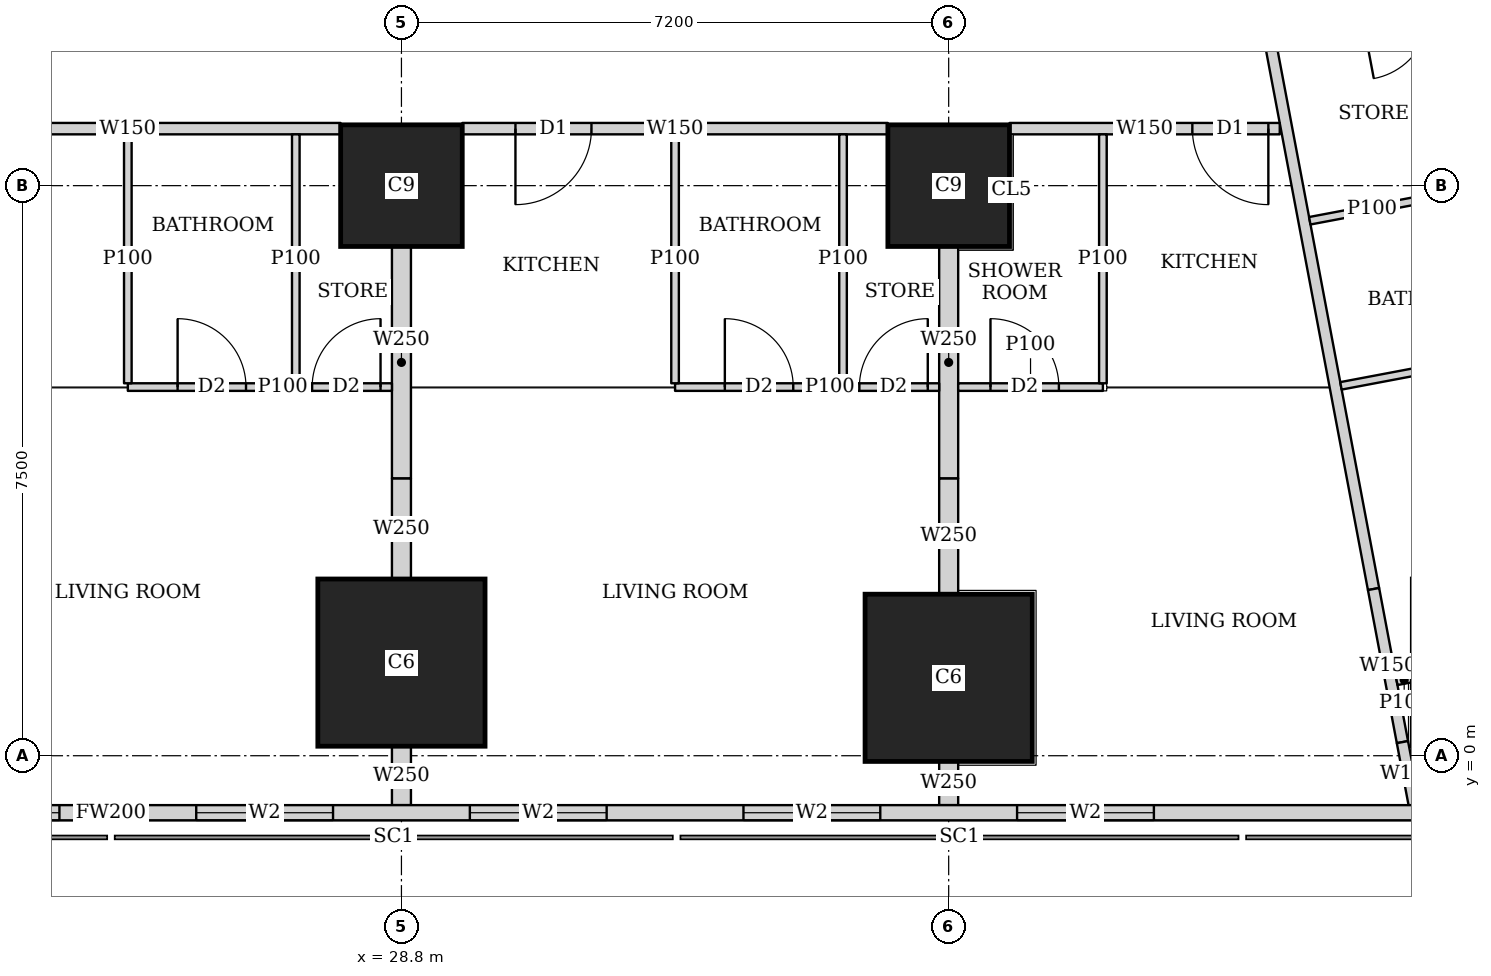
"""IFC4 building model, lengths in metres.
Left out: names, types, materials, properties, quantities, classifications, styles, units other than length and angle.
Written with IfcOpenShell. Run it as: python <this file> out.ifc"""

import sys

from ifc_helpers import new_model, si_unit, direction, frame, frame_2d, origin, origin_2d, place, context, subcontext, project, spatial, rectangle, extrude, element, fill, save


model = new_model("IFC4")
c1 = context("Model", 3, precision=1e-05, world=origin(), true_north=direction((0.0, 1.0)))
c2 = subcontext(c1, "Body", "Model", "MODEL_VIEW")
j1 = project(units=[si_unit("LENGTHUNIT", "METRE"), si_unit("PLANEANGLEUNIT", "RADIAN")], contexts=[c1])
p1 = place(None, origin())
s1 = spatial("IfcSite", under=j1, at=p1, CompositionType="ELEMENT")
p2 = place(p1, origin())
s2 = spatial("IfcBuilding", under=s1, at=p2, CompositionType="ELEMENT")
p3 = place(p2, frame((0.0, 0.0, 126.65)))
s3 = spatial("IfcBuildingStorey", under=s2, at=p3, CompositionType="ELEMENT", Elevation=126.65)
for number, where, z_axis, x_axis in (
    (1, (28.8, 1.225, 0.0), (0.0, 0.0, 1.0), (1.0, 0.0, 0.0)),
    (2, (36.0, 1.025, 0.0), (0.0, 0.0, 1.0), (1.0, 0.0, 0.0)),
):
    element("IfcColumn", number, at=place(p3, frame(where, z_axis=z_axis, x_axis=x_axis)), inside=s3, PredefinedType="COLUMN", context=c2, shape_type="SweptSolid", body=[
        extrude(rectangle(XDim=2.2, YDim=2.2, at=origin_2d()), origin(), (0.0, 0.0, 1.0), 3.75),
    ])
for number, where, z_axis, x_axis in (
    (3, (28.8, 7.5, 0.0), (0.0, 0.0, 1.0), (1.0, 0.0, 0.0)),
    (4, (36.0, 7.5, 0.0), (0.0, 0.0, 1.0), (1.0, 0.0, 0.0)),
):
    element("IfcColumn", number, at=place(p3, frame(where, z_axis=z_axis, x_axis=x_axis)), inside=s3, PredefinedType="COLUMN", context=c2, shape_type="SweptSolid", body=[
        extrude(rectangle(XDim=1.6, YDim=1.6, at=origin_2d()), origin(), (0.0, 0.0, 1.0), 3.75),
    ])
p4 = place(p3, frame((2.163, -0.75, 0.0), z_axis=(0.0, 0.0, 1.0), x_axis=(1.0, 0.0, 0.0)))
e5 = element("IfcWall", 5, at=p4, inside=s3, PredefinedType="SOLIDWALL", context=c2, shape_type="SweptSolid", body=[
    extrude(rectangle(XDim=45.628, YDim=0.2, at=frame_2d((22.814, 0.0))), origin(), (0.0, 0.0, 1.0), 3.45),
])
p5 = place(p4, frame((9.537, 0.0, 0.9)))
e6 = element("IfcOpeningElement", 6, at=p5, cuts=e5, PredefinedType="OPENING", context=c2, shape_type="SweptSolid", body=[
    extrude(rectangle(XDim=1.8, YDim=1.5, at=frame_2d((0.9, 0.75))), frame((0.0, 0.11, 0.0), z_axis=(0.0, -1.0, 0.0), x_axis=(1.0, 0.0, 0.0)), (0.0, 0.0, 1.0), 0.22),
])
p6 = place(p4, frame((13.137, 0.0, 0.9)))
e7 = element("IfcOpeningElement", 7, at=p6, cuts=e5, PredefinedType="OPENING", context=c2, shape_type="SweptSolid", body=[
    extrude(rectangle(XDim=1.8, YDim=1.5, at=frame_2d((0.9, 0.75))), frame((0.0, 0.11, 0.0), z_axis=(0.0, -1.0, 0.0), x_axis=(1.0, 0.0, 0.0)), (0.0, 0.0, 1.0), 0.22),
])
p7 = place(p4, frame((16.737, 0.0, 0.9)))
e8 = element("IfcOpeningElement", 8, at=p7, cuts=e5, PredefinedType="OPENING", context=c2, shape_type="SweptSolid", body=[
    extrude(rectangle(XDim=1.8, YDim=1.5, at=frame_2d((0.9, 0.75))), frame((0.0, 0.11, 0.0), z_axis=(0.0, -1.0, 0.0), x_axis=(1.0, 0.0, 0.0)), (0.0, 0.0, 1.0), 0.22),
])
p8 = place(p4, frame((20.337, 0.0, 0.9)))
e9 = element("IfcOpeningElement", 9, at=p8, cuts=e5, PredefinedType="OPENING", context=c2, shape_type="SweptSolid", body=[
    extrude(rectangle(XDim=1.8, YDim=1.5, at=frame_2d((0.9, 0.75))), frame((0.0, 0.11, 0.0), z_axis=(0.0, -1.0, 0.0), x_axis=(1.0, 0.0, 0.0)), (0.0, 0.0, 1.0), 0.22),
])
p9 = place(p4, frame((23.937, 0.0, 0.9)))
e10 = element("IfcOpeningElement", 10, at=p9, cuts=e5, PredefinedType="OPENING", context=c2, shape_type="SweptSolid", body=[
    extrude(rectangle(XDim=1.8, YDim=1.5, at=frame_2d((0.9, 0.75))), frame((0.0, 0.11, 0.0), z_axis=(0.0, -1.0, 0.0), x_axis=(1.0, 0.0, 0.0)), (0.0, 0.0, 1.0), 0.22),
])
p10 = place(p4, frame((27.537, 0.0, 0.9)))
e11 = element("IfcOpeningElement", 11, at=p10, cuts=e5, PredefinedType="OPENING", context=c2, shape_type="SweptSolid", body=[
    extrude(rectangle(XDim=1.8, YDim=1.5, at=frame_2d((0.9, 0.75))), frame((0.0, 0.11, 0.0), z_axis=(0.0, -1.0, 0.0), x_axis=(1.0, 0.0, 0.0)), (0.0, 0.0, 1.0), 0.22),
])
p11 = place(p4, frame((31.137, 0.0, 0.9)))
e12 = element("IfcOpeningElement", 12, at=p11, cuts=e5, PredefinedType="OPENING", context=c2, shape_type="SweptSolid", body=[
    extrude(rectangle(XDim=1.8, YDim=1.5, at=frame_2d((0.9, 0.75))), frame((0.0, 0.11, 0.0), z_axis=(0.0, -1.0, 0.0), x_axis=(1.0, 0.0, 0.0)), (0.0, 0.0, 1.0), 0.22),
])
p12 = place(p4, frame((34.737, 0.0, 0.9)))
e13 = element("IfcOpeningElement", 13, at=p12, cuts=e5, PredefinedType="OPENING", context=c2, shape_type="SweptSolid", body=[
    extrude(rectangle(XDim=1.8, YDim=1.5, at=frame_2d((0.9, 0.75))), frame((0.0, 0.11, 0.0), z_axis=(0.0, -1.0, 0.0), x_axis=(1.0, 0.0, 0.0)), (0.0, 0.0, 1.0), 0.22),
])
p13 = place(p3, frame((40.356, 8.25, 0.0), z_axis=(0.0, 0.0, 1.0), x_axis=(-1.0, 0.0, 0.0)))
e14 = element("IfcWall", 14, at=p13, inside=s3, PredefinedType="SOLIDWALL", context=c2, shape_type="SweptSolid", body=[
    extrude(rectangle(XDim=3.555, YDim=0.15, at=frame_2d((1.777, 0.0))), origin(), (0.0, 0.0, 1.0), 3.45),
])
p14 = place(p13, frame((0.15, 0.0, 0.0)))
e15 = element("IfcOpeningElement", 15, at=p14, cuts=e14, PredefinedType="OPENING", context=c2, shape_type="SweptSolid", body=[
    extrude(rectangle(XDim=1.0, YDim=2.1, at=frame_2d((0.5, 1.05))), frame((0.0, 0.085, 0.0), z_axis=(0.0, -1.0, 0.0), x_axis=(1.0, 0.0, 0.0)), (0.0, 0.0, 1.0), 0.17),
])
p15 = place(p3, frame((35.199, 8.25, 0.0), z_axis=(0.0, 0.0, 1.0), x_axis=(-1.0, 0.0, 0.0)))
e16 = element("IfcWall", 16, at=p15, inside=s3, PredefinedType="SOLIDWALL", context=c2, shape_type="SweptSolid", body=[
    extrude(rectangle(XDim=5.598, YDim=0.15, at=frame_2d((2.799, 0.0))), origin(), (0.0, 0.0, 1.0), 3.45),
])
p16 = place(p15, frame((3.899, 0.0, 0.0)))
e17 = element("IfcOpeningElement", 17, at=p16, cuts=e16, PredefinedType="OPENING", context=c2, shape_type="SweptSolid", body=[
    extrude(rectangle(XDim=1.0, YDim=2.1, at=frame_2d((0.5, 1.05))), frame((0.0, 0.085, 0.0), z_axis=(0.0, -1.0, 0.0), x_axis=(1.0, 0.0, 0.0)), (0.0, 0.0, 1.0), 0.17),
])
p17 = place(p3, frame((27.999, 8.25, 0.0), z_axis=(0.0, 0.0, 1.0), x_axis=(-1.0, 0.0, 0.0)))
e18 = element("IfcWall", 18, at=p17, inside=s3, PredefinedType="SOLIDWALL", context=c2, shape_type="SweptSolid", body=[
    extrude(rectangle(XDim=5.598, YDim=0.15, at=frame_2d((2.799, 0.0))), origin(), (0.0, 0.0, 1.0), 3.45),
])
p18 = place(p17, frame((3.899, 0.0, 0.0)))
e19 = element("IfcOpeningElement", 19, at=p18, cuts=e18, PredefinedType="OPENING", context=c2, shape_type="SweptSolid", body=[
    extrude(rectangle(XDim=1.0, YDim=2.1, at=frame_2d((0.5, 1.05))), frame((0.0, 0.085, 0.0), z_axis=(0.0, -1.0, 0.0), x_axis=(1.0, 0.0, 0.0)), (0.0, 0.0, 1.0), 0.17),
])
p19 = place(p3, frame((33.896, 42.929, 0.0), z_axis=(0.0, 0.0, 1.0), x_axis=(0.1855961604, -0.982626106535, 0.0)))
e20 = element("IfcWall", 20, at=p19, inside=s3, PredefinedType="SOLIDWALL", context=c2, shape_type="SweptSolid", body=[
    extrude(rectangle(XDim=41.456, YDim=0.15, at=frame_2d((20.728, 0.0))), origin(), (0.0, 0.0, 1.0), 2.45),
])
p20 = place(p19, frame((7.893, 0.0, 0.0)))
e21 = element("IfcOpeningElement", 21, at=p20, cuts=e20, PredefinedType="OPENING", context=c2, shape_type="SweptSolid", body=[
    extrude(rectangle(XDim=1.0, YDim=2.1, at=frame_2d((0.5, 1.05))), frame((0.0, 0.085, 0.0), z_axis=(0.0, -1.0, 0.0), x_axis=(1.0, 0.0, 0.0)), (0.0, 0.0, 1.0), 0.17),
])
p21 = place(p19, frame((12.468, 0.0, 0.0)))
e22 = element("IfcOpeningElement", 22, at=p21, cuts=e20, PredefinedType="OPENING", context=c2, shape_type="SweptSolid", body=[
    extrude(rectangle(XDim=1.0, YDim=2.1, at=frame_2d((0.5, 1.05))), frame((0.0, 0.085, 0.0), z_axis=(0.0, -1.0, 0.0), x_axis=(1.0, 0.0, 0.0)), (0.0, 0.0, 1.0), 0.17),
])
p22 = place(p19, frame((20.101, 0.0, 0.0)))
e23 = element("IfcOpeningElement", 23, at=p22, cuts=e20, PredefinedType="OPENING", context=c2, shape_type="SweptSolid", body=[
    extrude(rectangle(XDim=1.0, YDim=2.1, at=frame_2d((0.5, 1.05))), frame((0.0, 0.085, 0.0), z_axis=(0.0, -1.0, 0.0), x_axis=(1.0, 0.0, 0.0)), (0.0, 0.0, 1.0), 0.17),
])
p23 = place(p19, frame((31.064, 0.0, 0.0)))
e24 = element("IfcOpeningElement", 24, at=p23, cuts=e20, PredefinedType="OPENING", context=c2, shape_type="SweptSolid", body=[
    extrude(rectangle(XDim=1.0, YDim=2.1, at=frame_2d((0.5, 1.05))), frame((0.0, 0.085, 0.0), z_axis=(0.0, -1.0, 0.0), x_axis=(1.0, 0.0, 0.0)), (0.0, 0.0, 1.0), 0.17),
])
p24 = place(p3, frame((41.59, 2.193, 0.0), z_axis=(0.0, 0.0, 1.0), x_axis=(0.185338414215, -0.982674754034, 0.0)))
e25 = element("IfcWall", 25, at=p24, inside=s3, PredefinedType="SOLIDWALL", context=c2, shape_type="SweptSolid", body=[
    extrude(rectangle(XDim=2.05, YDim=0.15, at=frame_2d((1.025, 0.0))), origin(), (0.0, 0.0, 1.0), 2.15),
])
p25 = place(p3, frame((41.97, 0.179, 0.0), z_axis=(0.0, 0.0, 1.0), x_axis=(0.186088003244, -0.982533080893, 0.0)))
e26 = element("IfcWall", 26, at=p25, inside=s3, PredefinedType="SOLIDWALL", context=c2, shape_type="SweptSolid", body=[
    extrude(rectangle(XDim=0.844, YDim=0.15, at=frame_2d((0.422, 0.0))), origin(), (0.0, 0.0, 1.0), 3.45),
])
p26 = place(p3, frame((28.675, 4.85, 0.0), z_axis=(0.0, 0.0, 1.0), x_axis=(-1.0, 0.0, 0.0)))
e27 = element("IfcWall", 27, at=p26, inside=s3, PredefinedType="PARTITIONING", context=c2, shape_type="SweptSolid", body=[
    extrude(rectangle(XDim=3.475, YDim=0.1, at=frame_2d((1.738, 0.0))), origin(), (0.0, 0.0, 1.0), 3.45),
])
p27 = place(p26, frame((1.92, 0.0, 0.0)))
e28 = element("IfcOpeningElement", 28, at=p27, cuts=e27, PredefinedType="OPENING", context=c2, shape_type="SweptSolid", body=[
    extrude(rectangle(XDim=0.9, YDim=2.1, at=frame_2d((0.45, 1.05))), frame((0.0, 0.06, 0.0), z_axis=(0.0, -1.0, 0.0), x_axis=(1.0, 0.0, 0.0)), (0.0, 0.0, 1.0), 0.12),
])
p28 = place(p26, frame((0.15, 0.0, 0.0)))
e29 = element("IfcOpeningElement", 29, at=p28, cuts=e27, PredefinedType="OPENING", context=c2, shape_type="SweptSolid", body=[
    extrude(rectangle(XDim=0.9, YDim=2.1, at=frame_2d((0.45, 1.05))), frame((0.0, 0.06, 0.0), z_axis=(0.0, -1.0, 0.0), x_axis=(1.0, 0.0, 0.0)), (0.0, 0.0, 1.0), 0.12),
])
for number, where, z_axis, x_axis in (
    (30, (25.2, 4.9, 0.0), (0.0, 0.0, 1.0), (0.0, 1.0, 0.0)),
    (31, (27.41, 4.9, 0.0), (0.0, 0.0, 1.0), (0.0, 1.0, 0.0)),
):
    element("IfcWall", number, at=place(p3, frame(where, z_axis=z_axis, x_axis=x_axis)), inside=s3, PredefinedType="PARTITIONING", context=c2, shape_type="SweptSolid", body=[
        extrude(rectangle(XDim=3.275, YDim=0.1, at=frame_2d((1.638, 0.0))), origin(), (0.0, 0.0, 1.0), 3.45),
    ])
p29 = place(p3, frame((35.875, 4.85, 0.0), z_axis=(0.0, 0.0, 1.0), x_axis=(-1.0, 0.0, 0.0)))
e32 = element("IfcWall", 32, at=p29, inside=s3, PredefinedType="PARTITIONING", context=c2, shape_type="SweptSolid", body=[
    extrude(rectangle(XDim=3.475, YDim=0.1, at=frame_2d((1.738, 0.0))), origin(), (0.0, 0.0, 1.0), 3.45),
])
p30 = place(p29, frame((1.92, 0.0, 0.0)))
e33 = element("IfcOpeningElement", 33, at=p30, cuts=e32, PredefinedType="OPENING", context=c2, shape_type="SweptSolid", body=[
    extrude(rectangle(XDim=0.9, YDim=2.1, at=frame_2d((0.45, 1.05))), frame((0.0, 0.06, 0.0), z_axis=(0.0, -1.0, 0.0), x_axis=(1.0, 0.0, 0.0)), (0.0, 0.0, 1.0), 0.12),
])
p31 = place(p29, frame((0.15, 0.0, 0.0)))
e34 = element("IfcOpeningElement", 34, at=p31, cuts=e32, PredefinedType="OPENING", context=c2, shape_type="SweptSolid", body=[
    extrude(rectangle(XDim=0.9, YDim=2.1, at=frame_2d((0.45, 1.05))), frame((0.0, 0.06, 0.0), z_axis=(0.0, -1.0, 0.0), x_axis=(1.0, 0.0, 0.0)), (0.0, 0.0, 1.0), 0.12),
])
for number, where, z_axis, x_axis in (
    (35, (32.4, 4.9, 0.0), (0.0, 0.0, 1.0), (0.0, 1.0, 0.0)),
    (36, (34.61, 4.9, 0.0), (0.0, 0.0, 1.0), (0.0, 1.0, 0.0)),
):
    element("IfcWall", number, at=place(p3, frame(where, z_axis=z_axis, x_axis=x_axis)), inside=s3, PredefinedType="PARTITIONING", context=c2, shape_type="SweptSolid", body=[
        extrude(rectangle(XDim=3.275, YDim=0.1, at=frame_2d((1.638, 0.0))), origin(), (0.0, 0.0, 1.0), 3.45),
    ])
p32 = place(p3, frame((28.8, -0.65, 0.0), z_axis=(0.0, 0.0, 1.0), x_axis=(0.0, 1.0, 0.0)))
e37 = element("IfcWall", 37, at=p32, inside=s3, PredefinedType="SOLIDWALL", context=c2, shape_type="SweptSolid", body=[
    extrude(rectangle(XDim=0.774, YDim=0.25, at=frame_2d((0.387, 0.0))), origin(), (0.0, 0.0, 1.0), 3.45),
])
p33 = place(p3, frame((28.8, 2.326, 0.0), z_axis=(0.0, 0.0, 1.0), x_axis=(0.0, 1.0, 0.0)))
e38 = element("IfcWall", 38, at=p33, inside=s3, PredefinedType="SOLIDWALL", context=c2, shape_type="SweptSolid", body=[
    extrude(rectangle(XDim=1.324, YDim=0.25, at=frame_2d((0.662, 0.0))), origin(), (0.0, 0.0, 1.0), 3.45),
])
p34 = place(p3, frame((28.8, 3.65, 0.0), z_axis=(0.0, 0.0, 1.0), x_axis=(0.0, 1.0, 0.0)))
e39 = element("IfcWall", 39, at=p34, inside=s3, PredefinedType="SOLIDWALL", context=c2, shape_type="SweptSolid", body=[
    extrude(rectangle(XDim=3.049, YDim=0.25, at=frame_2d((1.524, 0.0))), origin(), (0.0, 0.0, 1.0), 3.45),
])
p35 = place(p3, frame((38.029, 4.85, 0.0), z_axis=(0.0, 0.0, 1.0), x_axis=(-1.0, 0.0, 0.0)))
e40 = element("IfcWall", 40, at=p35, inside=s3, PredefinedType="PARTITIONING", context=c2, shape_type="SweptSolid", body=[
    extrude(rectangle(XDim=1.904, YDim=0.1, at=frame_2d((0.952, 0.0))), origin(), (0.0, 0.0, 1.0), 3.45),
])
p36 = place(p35, frame((0.579, 0.0, 0.0)))
e41 = element("IfcOpeningElement", 41, at=p36, cuts=e40, PredefinedType="OPENING", context=c2, shape_type="SweptSolid", body=[
    extrude(rectangle(XDim=0.9, YDim=2.1, at=frame_2d((0.45, 1.05))), frame((0.0, 0.06, 0.0), z_axis=(0.0, -1.0, 0.0), x_axis=(1.0, 0.0, 0.0)), (0.0, 0.0, 1.0), 0.12),
])
p37 = place(p3, frame((38.029, 4.9, 0.0), z_axis=(0.0, 0.0, 1.0), x_axis=(0.0, 1.0, 0.0)))
e42 = element("IfcWall", 42, at=p37, inside=s3, PredefinedType="PARTITIONING", context=c2, shape_type="SweptSolid", body=[
    extrude(rectangle(XDim=3.275, YDim=0.1, at=frame_2d((1.638, 0.0))), origin(), (0.0, 0.0, 1.0), 3.45),
])
p38 = place(p3, frame((36.0, -0.65, 0.0), z_axis=(0.0, 0.0, 1.0), x_axis=(0.0, 1.0, 0.0)))
e43 = element("IfcWall", 43, at=p38, inside=s3, PredefinedType="SOLIDWALL", context=c2, shape_type="SweptSolid", body=[
    extrude(rectangle(XDim=0.574, YDim=0.25, at=frame_2d((0.287, 0.0))), origin(), (0.0, 0.0, 1.0), 3.45),
])
p39 = place(p3, frame((36.0, 2.126, 0.0), z_axis=(0.0, 0.0, 1.0), x_axis=(0.0, 1.0, 0.0)))
e44 = element("IfcWall", 44, at=p39, inside=s3, PredefinedType="SOLIDWALL", context=c2, shape_type="SweptSolid", body=[
    extrude(rectangle(XDim=1.524, YDim=0.25, at=frame_2d((0.762, 0.0))), origin(), (0.0, 0.0, 1.0), 3.45),
])
p40 = place(p3, frame((36.0, 3.65, 0.0), z_axis=(0.0, 0.0, 1.0), x_axis=(0.0, 1.0, 0.0)))
e45 = element("IfcWall", 45, at=p40, inside=s3, PredefinedType="SOLIDWALL", context=c2, shape_type="SweptSolid", body=[
    extrude(rectangle(XDim=3.049, YDim=0.25, at=frame_2d((1.524, 0.0))), origin(), (0.0, 0.0, 1.0), 3.45),
])
p41 = place(p3, frame((42.39, 7.348, 0.0), z_axis=(0.0, 0.0, 1.0), x_axis=(-0.9825976927, -0.185746532405, 0.0)))
e46 = element("IfcWall", 46, at=p41, inside=s3, PredefinedType="PARTITIONING", context=c2, shape_type="SweptSolid", body=[
    extrude(rectangle(XDim=1.668, YDim=0.1, at=frame_2d((0.834, 0.0))), origin(), (0.0, 0.0, 1.0), 3.45),
])
p42 = place(p3, frame((42.09, 1.016, 0.0), z_axis=(0.0, 0.0, 1.0), x_axis=(-0.982208563973, -0.187793335502, 0.0)))
e47 = element("IfcWall", 47, at=p42, inside=s3, PredefinedType="PARTITIONING", context=c2, shape_type="SweptSolid", body=[
    extrude(rectangle(XDim=0.198, YDim=0.1, at=frame_2d((0.099, 0.0))), origin(), (0.0, 0.0, 1.0), 2.0),
])
p43 = place(p3, frame((44.379, 5.474, 0.0), z_axis=(0.0, 0.0, 1.0), x_axis=(-0.982607026909, -0.185697147715, 0.0)))
e48 = element("IfcWall", 48, at=p43, inside=s3, PredefinedType="PARTITIONING", context=c2, shape_type="SweptSolid", body=[
    extrude(rectangle(XDim=3.275, YDim=0.1, at=frame_2d((1.637, 0.0))), origin(), (0.0, 0.0, 1.0), 3.45),
])
p44 = place(p8, origin())
e49 = element("IfcWindow", 49, at=p44, inside=s3, PartitioningType="SINGLE_PANEL", PredefinedType="WINDOW", context=c2, shape_type="SweptSolid", body=[
    extrude(rectangle(XDim=1.8, YDim=1.5, at=frame_2d((0.9, 0.75))), frame((0.0, 0.03, 0.0), z_axis=(0.0, -1.0, 0.0), x_axis=(1.0, 0.0, 0.0)), (0.0, 0.0, 1.0), 0.06),
])
fill(e9, e49)
p45 = place(p9, origin())
e50 = element("IfcWindow", 50, at=p45, inside=s3, PartitioningType="SINGLE_PANEL", PredefinedType="WINDOW", context=c2, shape_type="SweptSolid", body=[
    extrude(rectangle(XDim=1.8, YDim=1.5, at=frame_2d((0.9, 0.75))), frame((0.0, 0.03, 0.0), z_axis=(0.0, -1.0, 0.0), x_axis=(1.0, 0.0, 0.0)), (0.0, 0.0, 1.0), 0.06),
])
fill(e10, e50)
p46 = place(p10, origin())
e51 = element("IfcWindow", 51, at=p46, inside=s3, PartitioningType="SINGLE_PANEL", PredefinedType="WINDOW", context=c2, shape_type="SweptSolid", body=[
    extrude(rectangle(XDim=1.8, YDim=1.5, at=frame_2d((0.9, 0.75))), frame((0.0, 0.03, 0.0), z_axis=(0.0, -1.0, 0.0), x_axis=(1.0, 0.0, 0.0)), (0.0, 0.0, 1.0), 0.06),
])
fill(e11, e51)
p47 = place(p11, origin())
e52 = element("IfcWindow", 52, at=p47, inside=s3, PartitioningType="SINGLE_PANEL", PredefinedType="WINDOW", context=c2, shape_type="SweptSolid", body=[
    extrude(rectangle(XDim=1.8, YDim=1.5, at=frame_2d((0.9, 0.75))), frame((0.0, 0.03, 0.0), z_axis=(0.0, -1.0, 0.0), x_axis=(1.0, 0.0, 0.0)), (0.0, 0.0, 1.0), 0.06),
])
fill(e12, e52)
p48 = place(p12, origin())
e53 = element("IfcWindow", 53, at=p48, inside=s3, PartitioningType="SINGLE_PANEL", PredefinedType="WINDOW", context=c2, shape_type="SweptSolid", body=[
    extrude(rectangle(XDim=1.8, YDim=1.5, at=frame_2d((0.9, 0.75))), frame((0.0, 0.03, 0.0), z_axis=(0.0, -1.0, 0.0), x_axis=(1.0, 0.0, 0.0)), (0.0, 0.0, 1.0), 0.06),
])
fill(e13, e53)
p49 = place(p27, origin())
e54 = element("IfcDoor", 54, at=p49, inside=s3, OperationType="SINGLE_SWING_LEFT", PredefinedType="DOOR", context=c2, shape_type="SweptSolid", body=[
    extrude(rectangle(XDim=0.9, YDim=2.1, at=frame_2d((0.45, 1.05))), frame((0.0, 0.025, 0.0), z_axis=(0.0, -1.0, 0.0), x_axis=(1.0, 0.0, 0.0)), (0.0, 0.0, 1.0), 0.05),
])
fill(e28, e54)
p50 = place(p28, origin())
e55 = element("IfcDoor", 55, at=p50, inside=s3, OperationType="SINGLE_SWING_RIGHT", PredefinedType="DOOR", context=c2, shape_type="SweptSolid", body=[
    extrude(rectangle(XDim=0.9, YDim=2.1, at=frame_2d((0.45, 1.05))), frame((0.0, 0.025, 0.0), z_axis=(0.0, -1.0, 0.0), x_axis=(1.0, 0.0, 0.0)), (0.0, 0.0, 1.0), 0.05),
])
fill(e29, e55)
p51 = place(p30, origin())
e56 = element("IfcDoor", 56, at=p51, inside=s3, OperationType="SINGLE_SWING_LEFT", PredefinedType="DOOR", context=c2, shape_type="SweptSolid", body=[
    extrude(rectangle(XDim=0.9, YDim=2.1, at=frame_2d((0.45, 1.05))), frame((0.0, 0.025, 0.0), z_axis=(0.0, -1.0, 0.0), x_axis=(1.0, 0.0, 0.0)), (0.0, 0.0, 1.0), 0.05),
])
fill(e33, e56)
p52 = place(p31, origin())
e57 = element("IfcDoor", 57, at=p52, inside=s3, OperationType="SINGLE_SWING_RIGHT", PredefinedType="DOOR", context=c2, shape_type="SweptSolid", body=[
    extrude(rectangle(XDim=0.9, YDim=2.1, at=frame_2d((0.45, 1.05))), frame((0.0, 0.025, 0.0), z_axis=(0.0, -1.0, 0.0), x_axis=(1.0, 0.0, 0.0)), (0.0, 0.0, 1.0), 0.05),
])
fill(e34, e57)
p53 = place(p16, origin())
e58 = element("IfcDoor", 58, at=p53, inside=s3, OperationType="SINGLE_SWING_RIGHT", PredefinedType="DOOR", context=c2, shape_type="SweptSolid", body=[
    extrude(rectangle(XDim=1.0, YDim=2.1, at=frame_2d((0.5, 1.05))), frame((0.0, 0.025, 0.0), z_axis=(0.0, -1.0, 0.0), x_axis=(1.0, 0.0, 0.0)), (0.0, 0.0, 1.0), 0.05),
])
fill(e17, e58)
p54 = place(p36, origin())
e59 = element("IfcDoor", 59, at=p54, inside=s3, OperationType="SINGLE_SWING_LEFT", PredefinedType="DOOR", context=c2, shape_type="SweptSolid", body=[
    extrude(rectangle(XDim=0.9, YDim=2.1, at=frame_2d((0.45, 1.05))), frame((0.0, 0.025, 0.0), z_axis=(0.0, -1.0, 0.0), x_axis=(1.0, 0.0, 0.0)), (0.0, 0.0, 1.0), 0.05),
])
fill(e41, e59)
p55 = place(p14, origin())
e60 = element("IfcDoor", 60, at=p55, inside=s3, OperationType="SINGLE_SWING_LEFT", PredefinedType="DOOR", context=c2, shape_type="SweptSolid", body=[
    extrude(rectangle(XDim=1.0, YDim=2.1, at=frame_2d((0.5, 1.05))), frame((0.0, 0.025, 0.0), z_axis=(0.0, -1.0, 0.0), x_axis=(1.0, 0.0, 0.0)), (0.0, 0.0, 1.0), 0.05),
])
fill(e15, e60)
save(model, sys.argv[1])
